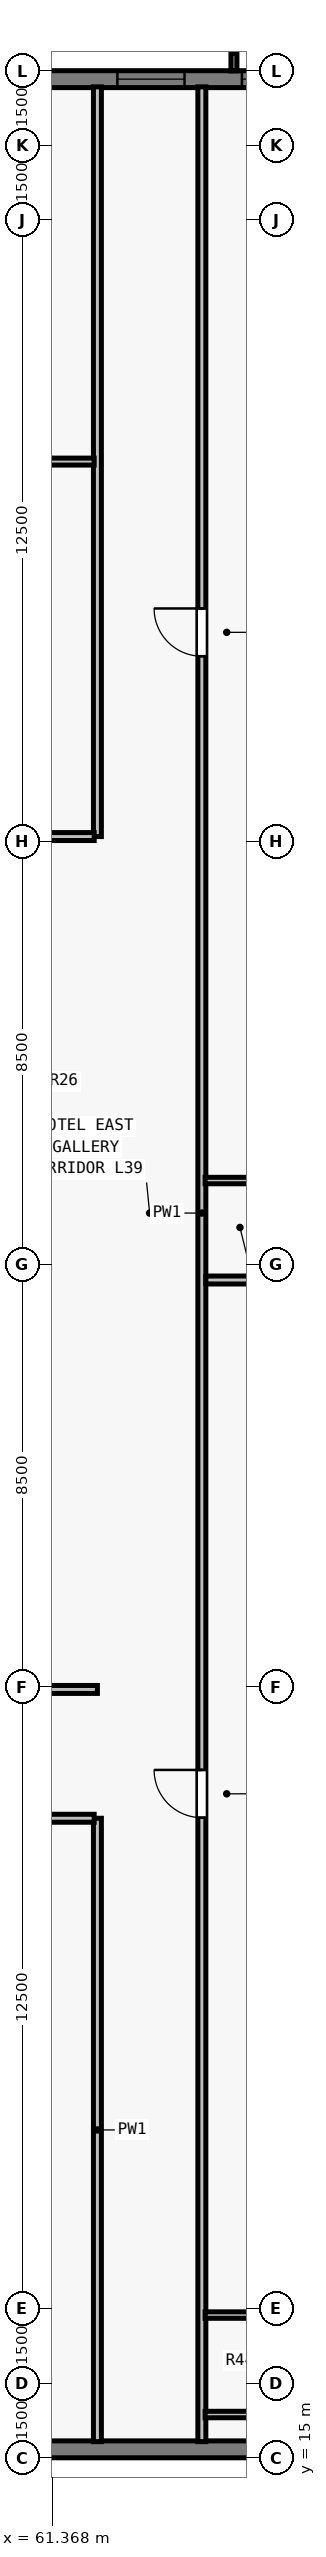
"""IFC4 building model, lengths in metres.
Left out: names, types, materials, properties, quantities, classifications, styles, units other than length and angle.
Written with IfcOpenShell. Run it as: python <this file> out.ifc"""

import sys

from ifc_helpers import new_model, si_unit, direction, frame, frame_2d, origin, place, context, subcontext, project, spatial, rectangle, extrude, element, fill, save


model = new_model("IFC4")
c1 = context("Model", 3, precision=1e-05, world=origin(), true_north=direction((0.0, 1.0)))
c2 = subcontext(c1, "Body", "Model", "MODEL_VIEW")
j1 = project(units=[si_unit("LENGTHUNIT", "METRE"), si_unit("PLANEANGLEUNIT", "RADIAN")], contexts=[c1])
p1 = place(None, origin())
s1 = spatial("IfcSite", under=j1, at=p1, CompositionType="ELEMENT")
p2 = place(p1, origin())
s2 = spatial("IfcBuilding", under=s1, at=p2, CompositionType="ELEMENT")
p3 = place(p2, frame((0.0, 0.0, 144.5)))
s3 = spatial("IfcBuildingStorey", under=s2, at=p3, CompositionType="ELEMENT", Elevation=144.5)
p4 = place(p3, frame((32.0, 62.83, 0.0), z_axis=(0.0, 0.0, 1.0), x_axis=(1.0, 0.0, 0.0)))
e1 = element("IfcWall", 1, at=p4, inside=s3, PredefinedType="SOLIDWALL", context=c2, shape_type="SweptSolid", body=[
    extrude(rectangle(XDim=39.682, YDim=0.34, at=frame_2d((19.841, 0.0))), origin(), (0.0, 0.0, 1.0), 3.28),
])
p5 = place(p4, frame((3.902, 0.0, 0.8)))
e2 = element("IfcOpeningElement", 2, at=p5, cuts=e1, PredefinedType="OPENING", context=c2, shape_type="SweptSolid", body=[
    extrude(rectangle(XDim=1.75, YDim=1.66, at=frame_2d((0.875, 0.83))), frame((0.0, 0.18, 0.0), z_axis=(0.0, -1.0, 0.0), x_axis=(1.0, 0.0, 0.0)), (0.0, 0.0, 1.0), 0.36),
])
p6 = place(p4, frame((8.505, 0.0, 0.8)))
e3 = element("IfcOpeningElement", 3, at=p6, cuts=e1, PredefinedType="OPENING", context=c2, shape_type="SweptSolid", body=[
    extrude(rectangle(XDim=1.35, YDim=1.66, at=frame_2d((0.675, 0.83))), frame((0.0, 0.18, 0.0), z_axis=(0.0, -1.0, 0.0), x_axis=(1.0, 0.0, 0.0)), (0.0, 0.0, 1.0), 0.36),
])
p7 = place(p4, frame((11.859, 0.0, 0.8)))
e4 = element("IfcOpeningElement", 4, at=p7, cuts=e1, PredefinedType="OPENING", context=c2, shape_type="SweptSolid", body=[
    extrude(rectangle(XDim=1.75, YDim=1.66, at=frame_2d((0.875, 0.83))), frame((0.0, 0.18, 0.0), z_axis=(0.0, -1.0, 0.0), x_axis=(1.0, 0.0, 0.0)), (0.0, 0.0, 1.0), 0.36),
])
p8 = place(p4, frame((16.062, 0.0, 0.8)))
e5 = element("IfcOpeningElement", 5, at=p8, cuts=e1, PredefinedType="OPENING", context=c2, shape_type="SweptSolid", body=[
    extrude(rectangle(XDim=1.35, YDim=1.66, at=frame_2d((0.675, 0.83))), frame((0.0, 0.18, 0.0), z_axis=(0.0, -1.0, 0.0), x_axis=(1.0, 0.0, 0.0)), (0.0, 0.0, 1.0), 0.36),
])
p9 = place(p4, frame((17.716, 0.0, 0.8)))
e6 = element("IfcOpeningElement", 6, at=p9, cuts=e1, PredefinedType="OPENING", context=c2, shape_type="SweptSolid", body=[
    extrude(rectangle(XDim=1.75, YDim=1.66, at=frame_2d((0.875, 0.83))), frame((0.0, 0.18, 0.0), z_axis=(0.0, -1.0, 0.0), x_axis=(1.0, 0.0, 0.0)), (0.0, 0.0, 1.0), 0.36),
])
p10 = place(p4, frame((22.719, 0.0, 0.8)))
e7 = element("IfcOpeningElement", 7, at=p10, cuts=e1, PredefinedType="OPENING", context=c2, shape_type="SweptSolid", body=[
    extrude(rectangle(XDim=1.35, YDim=1.66, at=frame_2d((0.675, 0.83))), frame((0.0, 0.18, 0.0), z_axis=(0.0, -1.0, 0.0), x_axis=(1.0, 0.0, 0.0)), (0.0, 0.0, 1.0), 0.36),
])
p11 = place(p4, frame((26.073, 0.0, 0.8)))
e8 = element("IfcOpeningElement", 8, at=p11, cuts=e1, PredefinedType="OPENING", context=c2, shape_type="SweptSolid", body=[
    extrude(rectangle(XDim=1.75, YDim=1.66, at=frame_2d((0.875, 0.83))), frame((0.0, 0.18, 0.0), z_axis=(0.0, -1.0, 0.0), x_axis=(1.0, 0.0, 0.0)), (0.0, 0.0, 1.0), 0.36),
])
p12 = place(p4, frame((30.677, 0.0, 0.8)))
e9 = element("IfcOpeningElement", 9, at=p12, cuts=e1, PredefinedType="OPENING", context=c2, shape_type="SweptSolid", body=[
    extrude(rectangle(XDim=1.35, YDim=1.66, at=frame_2d((0.675, 0.83))), frame((0.0, 0.18, 0.0), z_axis=(0.0, -1.0, 0.0), x_axis=(1.0, 0.0, 0.0)), (0.0, 0.0, 1.0), 0.36),
])
p13 = place(p4, frame((33.18, 0.0, 0.8)))
e10 = element("IfcOpeningElement", 10, at=p13, cuts=e1, PredefinedType="OPENING", context=c2, shape_type="SweptSolid", body=[
    extrude(rectangle(XDim=1.75, YDim=1.66, at=frame_2d((0.875, 0.83))), frame((0.0, 0.18, 0.0), z_axis=(0.0, -1.0, 0.0), x_axis=(1.0, 0.0, 0.0)), (0.0, 0.0, 1.0), 0.36),
])
p14 = place(p3, frame((72.0, 15.17, 0.0), z_axis=(0.0, 0.0, 1.0), x_axis=(-1.0, 0.0, 0.0)))
e11 = element("IfcWall", 11, at=p14, inside=s3, PredefinedType="SOLIDWALL", context=c2, shape_type="SweptSolid", body=[
    extrude(rectangle(XDim=25.882, YDim=0.34, at=frame_2d((12.941, 0.0))), origin(), (0.0, 0.0, 1.0), 3.28),
])
p15 = place(p14, frame((12.066, 0.0, 0.8)))
e12 = element("IfcOpeningElement", 12, at=p15, cuts=e11, PredefinedType="OPENING", context=c2, shape_type="SweptSolid", body=[
    extrude(rectangle(XDim=1.75, YDim=1.66, at=frame_2d((0.875, 0.83))), frame((0.0, 0.18, 0.0), z_axis=(0.0, -1.0, 0.0), x_axis=(1.0, 0.0, 0.0)), (0.0, 0.0, 1.0), 0.36),
])
p16 = place(p14, frame((15.902, 0.0, 0.8)))
e13 = element("IfcOpeningElement", 13, at=p16, cuts=e11, PredefinedType="OPENING", context=c2, shape_type="SweptSolid", body=[
    extrude(rectangle(XDim=1.35, YDim=1.66, at=frame_2d((0.675, 0.83))), frame((0.0, 0.18, 0.0), z_axis=(0.0, -1.0, 0.0), x_axis=(1.0, 0.0, 0.0)), (0.0, 0.0, 1.0), 0.36),
])
p17 = place(p14, frame((18.889, 0.0, 0.8)))
e14 = element("IfcOpeningElement", 14, at=p17, cuts=e11, PredefinedType="OPENING", context=c2, shape_type="SweptSolid", body=[
    extrude(rectangle(XDim=1.75, YDim=1.66, at=frame_2d((0.875, 0.83))), frame((0.0, 0.18, 0.0), z_axis=(0.0, -1.0, 0.0), x_axis=(1.0, 0.0, 0.0)), (0.0, 0.0, 1.0), 0.36),
])
p18 = place(p14, frame((21.59, 0.0, 0.8)))
e15 = element("IfcOpeningElement", 15, at=p18, cuts=e11, PredefinedType="OPENING", context=c2, shape_type="SweptSolid", body=[
    extrude(rectangle(XDim=0.9, YDim=1.66, at=frame_2d((0.45, 0.83))), frame((0.0, 0.18, 0.0), z_axis=(0.0, -1.0, 0.0), x_axis=(1.0, 0.0, 0.0)), (0.0, 0.0, 1.0), 0.36),
])
p19 = place(p3, frame((64.375, 15.325, 0.0), z_axis=(0.0, 0.0, 1.0), x_axis=(0.0, 1.0, 0.0)))
e16 = element("IfcWall", 16, at=p19, inside=s3, PredefinedType="PARTITIONING", context=c2, shape_type="SweptSolid", body=[
    extrude(rectangle(XDim=47.35, YDim=0.16, at=frame_2d((23.675, 0.0))), origin(), (0.0, 0.0, 1.0), 2.555),
])
p20 = place(p19, frame((12.547, 0.0, 0.0)))
e17 = element("IfcOpeningElement", 17, at=p20, cuts=e16, PredefinedType="OPENING", context=c2, shape_type="SweptSolid", body=[
    extrude(rectangle(XDim=0.96, YDim=2.15, at=frame_2d((0.48, 1.075))), frame((0.0, 0.09, 0.0), z_axis=(0.0, -1.0, 0.0), x_axis=(1.0, 0.0, 0.0)), (0.0, 0.0, 1.0), 0.18),
])
p21 = place(p19, frame((35.902, 0.0, 0.0)))
e18 = element("IfcOpeningElement", 18, at=p21, cuts=e16, PredefinedType="OPENING", context=c2, shape_type="SweptSolid", body=[
    extrude(rectangle(XDim=0.96, YDim=2.15, at=frame_2d((0.48, 1.075))), frame((0.0, 0.09, 0.0), z_axis=(0.0, -1.0, 0.0), x_axis=(1.0, 0.0, 0.0)), (0.0, 0.0, 1.0), 0.18),
])
p22 = place(p3, frame((62.275, 15.325, 0.0), z_axis=(0.0, 0.0, 1.0), x_axis=(0.0, 1.0, 0.0)))
e19 = element("IfcWall", 19, at=p22, inside=s3, PredefinedType="PARTITIONING", context=c2, shape_type="SweptSolid", body=[
    extrude(rectangle(XDim=12.535, YDim=0.16, at=frame_2d((6.268, 0.0))), origin(), (0.0, 0.0, 1.0), 3.28),
])
p23 = place(p3, frame((62.275, 47.6, 0.0), z_axis=(0.0, 0.0, 1.0), x_axis=(0.0, 1.0, 0.0)))
e20 = element("IfcWall", 20, at=p23, inside=s3, PredefinedType="PARTITIONING", context=c2, shape_type="SweptSolid", body=[
    extrude(rectangle(XDim=15.075, YDim=0.16, at=frame_2d((7.538, 0.0))), origin(), (0.0, 0.0, 1.0), 2.555),
])
p24 = place(p3, frame((60.765, 30.45, 0.0), z_axis=(0.0, 0.0, 1.0), x_axis=(1.0, 0.0, 0.0)))
e21 = element("IfcWall", 21, at=p24, inside=s3, PredefinedType="PARTITIONING", context=c2, shape_type="SweptSolid", body=[
    extrude(rectangle(XDim=1.51, YDim=0.16, at=frame_2d((0.755, 0.0))), origin(), (0.0, 0.0, 1.0), 3.28),
])
p25 = place(p3, frame((60.765, 47.6, 0.0), z_axis=(0.0, 0.0, 1.0), x_axis=(1.0, 0.0, 0.0)))
e22 = element("IfcWall", 22, at=p25, inside=s3, PredefinedType="PARTITIONING", context=c2, shape_type="SweptSolid", body=[
    extrude(rectangle(XDim=1.445, YDim=0.16, at=frame_2d((0.723, 0.0))), origin(), (0.0, 0.0, 1.0), 3.28),
])
p26 = place(p3, frame((40.14, 27.86, 0.0), z_axis=(0.0, 0.0, 1.0), x_axis=(1.0, 0.0, 0.0)))
e23 = element("IfcWall", 23, at=p26, inside=s3, PredefinedType="PARTITIONING", context=c2, shape_type="SweptSolid", body=[
    extrude(rectangle(XDim=22.07, YDim=0.16, at=frame_2d((11.035, 0.0))), origin(), (0.0, 0.0, 1.0), 3.28),
])
p27 = place(p26, frame((3.834, 0.0, 0.0)))
e24 = element("IfcOpeningElement", 24, at=p27, cuts=e23, PredefinedType="OPENING", context=c2, shape_type="SweptSolid", body=[
    extrude(rectangle(XDim=0.96, YDim=2.15, at=frame_2d((0.48, 1.075))), frame((0.0, 0.09, 0.0), z_axis=(0.0, -1.0, 0.0), x_axis=(1.0, 0.0, 0.0)), (0.0, 0.0, 1.0), 0.18),
])
p28 = place(p26, frame((8.746, 0.0, 0.0)))
e25 = element("IfcOpeningElement", 25, at=p28, cuts=e23, PredefinedType="OPENING", context=c2, shape_type="SweptSolid", body=[
    extrude(rectangle(XDim=0.96, YDim=2.15, at=frame_2d((0.48, 1.075))), frame((0.0, 0.09, 0.0), z_axis=(0.0, -1.0, 0.0), x_axis=(1.0, 0.0, 0.0)), (0.0, 0.0, 1.0), 0.18),
])
p29 = place(p26, frame((14.46, 0.0, 0.0)))
e26 = element("IfcOpeningElement", 26, at=p29, cuts=e23, PredefinedType="OPENING", context=c2, shape_type="SweptSolid", body=[
    extrude(rectangle(XDim=0.96, YDim=2.15, at=frame_2d((0.48, 1.075))), frame((0.0, 0.09, 0.0), z_axis=(0.0, -1.0, 0.0), x_axis=(1.0, 0.0, 0.0)), (0.0, 0.0, 1.0), 0.18),
])
p30 = place(p26, frame((19.993, 0.0, 0.0)))
e27 = element("IfcOpeningElement", 27, at=p30, cuts=e23, PredefinedType="OPENING", context=c2, shape_type="SweptSolid", body=[
    extrude(rectangle(XDim=0.96, YDim=2.15, at=frame_2d((0.48, 1.075))), frame((0.0, 0.09, 0.0), z_axis=(0.0, -1.0, 0.0), x_axis=(1.0, 0.0, 0.0)), (0.0, 0.0, 1.0), 0.18),
])
p31 = place(p3, frame((40.14, 55.14, 0.0), z_axis=(0.0, 0.0, 1.0), x_axis=(1.0, 0.0, 0.0)))
e28 = element("IfcWall", 28, at=p31, inside=s3, PredefinedType="PARTITIONING", context=c2, shape_type="SweptSolid", body=[
    extrude(rectangle(XDim=22.07, YDim=0.14, at=frame_2d((11.035, 0.0))), origin(), (0.0, 0.0, 1.0), 3.28),
])
p32 = place(p31, frame((3.435, 0.0, 0.0)))
e29 = element("IfcOpeningElement", 29, at=p32, cuts=e28, PredefinedType="OPENING", context=c2, shape_type="SweptSolid", body=[
    extrude(rectangle(XDim=0.92, YDim=2.12, at=frame_2d((0.46, 1.06))), frame((0.0, 0.08, 0.0), z_axis=(0.0, -1.0, 0.0), x_axis=(1.0, 0.0, 0.0)), (0.0, 0.0, 1.0), 0.16),
])
p33 = place(p31, frame((14.435, 0.0, 0.0)))
e30 = element("IfcOpeningElement", 30, at=p33, cuts=e28, PredefinedType="OPENING", context=c2, shape_type="SweptSolid", body=[
    extrude(rectangle(XDim=0.92, YDim=2.12, at=frame_2d((0.46, 1.06))), frame((0.0, 0.08, 0.0), z_axis=(0.0, -1.0, 0.0), x_axis=(1.0, 0.0, 0.0)), (0.0, 0.0, 1.0), 0.16),
])
for number, where, z_axis, x_axis in (
    (31, (64.44, 15.87, 0.0), (0.0, 0.0, 1.0), (1.0, 0.0, 0.0)),
    (32, (64.44, 17.87, 0.0), (0.0, 0.0, 1.0), (1.0, 0.0, 0.0)),
):
    element("IfcWall", number, at=place(p3, frame(where, z_axis=z_axis, x_axis=x_axis)), inside=s3, PredefinedType="PLUMBINGWALL", context=c2, shape_type="SweptSolid", body=[
        extrude(rectangle(XDim=2.315, YDim=0.13, at=frame_2d((1.157, 0.0))), origin(), (0.0, 0.0, 1.0), 3.28),
    ])
p34 = place(p3, frame((64.455, 38.683, 0.0), z_axis=(0.0, 0.0, 1.0), x_axis=(1.0, 0.0, 0.0)))
e33 = element("IfcWall", 33, at=p34, inside=s3, PredefinedType="PARTITIONING", context=c2, shape_type="SweptSolid", body=[
    extrude(rectangle(XDim=11.22, YDim=0.16, at=frame_2d((5.61, 0.0))), origin(), (0.0, 0.0, 1.0), 3.28),
])
p35 = place(p3, frame((64.44, 40.683, 0.0), z_axis=(0.0, 0.0, 1.0), x_axis=(1.0, 0.0, 0.0)))
e34 = element("IfcWall", 34, at=p35, inside=s3, PredefinedType="PLUMBINGWALL", context=c2, shape_type="SweptSolid", body=[
    extrude(rectangle(XDim=2.315, YDim=0.13, at=frame_2d((1.157, 0.0))), origin(), (0.0, 0.0, 1.0), 3.28),
])
p36 = place(p12, origin())
e35 = element("IfcWindow", 35, at=p36, inside=s3, PartitioningType="SINGLE_PANEL", PredefinedType="WINDOW", context=c2, shape_type="SweptSolid", body=[
    extrude(rectangle(XDim=1.35, YDim=1.66, at=frame_2d((0.675, 0.83))), frame((0.0, -0.05, 0.0), z_axis=(0.0, -1.0, 0.0), x_axis=(1.0, 0.0, 0.0)), (0.0, 0.0, 1.0), 0.06),
])
fill(e9, e35)
p37 = place(p13, origin())
e36 = element("IfcWindow", 36, at=p37, inside=s3, PartitioningType="SINGLE_PANEL", PredefinedType="WINDOW", context=c2, shape_type="SweptSolid", body=[
    extrude(rectangle(XDim=1.75, YDim=1.66, at=frame_2d((0.875, 0.83))), frame((0.0, -0.05, 0.0), z_axis=(0.0, -1.0, 0.0), x_axis=(1.0, 0.0, 0.0)), (0.0, 0.0, 1.0), 0.06),
])
fill(e10, e36)
p38 = place(p20, origin())
e37 = element("IfcDoor", 37, at=p38, inside=s3, OperationType="SINGLE_SWING_RIGHT", PredefinedType="DOOR", context=c2, shape_type="SweptSolid", body=[
    extrude(rectangle(XDim=0.96, YDim=2.15, at=frame_2d((0.48, 1.075))), frame((0.0, 0.025, 0.0), z_axis=(0.0, -1.0, 0.0), x_axis=(1.0, 0.0, 0.0)), (0.0, 0.0, 1.0), 0.05),
])
fill(e17, e37)
p39 = place(p21, origin())
e38 = element("IfcDoor", 38, at=p39, inside=s3, OperationType="SINGLE_SWING_RIGHT", PredefinedType="DOOR", context=c2, shape_type="SweptSolid", body=[
    extrude(rectangle(XDim=0.96, YDim=2.15, at=frame_2d((0.48, 1.075))), frame((0.0, 0.025, 0.0), z_axis=(0.0, -1.0, 0.0), x_axis=(1.0, 0.0, 0.0)), (0.0, 0.0, 1.0), 0.05),
])
fill(e18, e38)
save(model, sys.argv[1])
